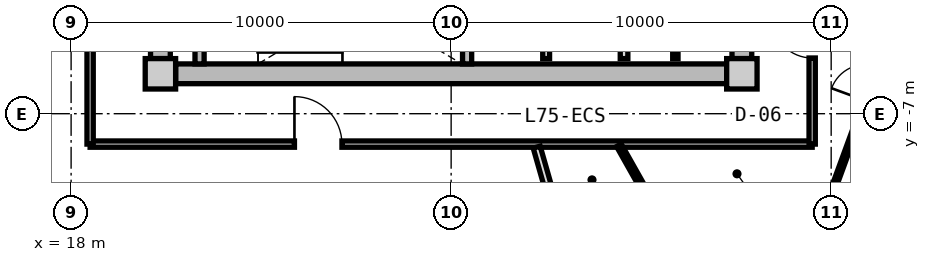
"""IFC4 building model, lengths in metres.
Left out: names, types, materials, properties, quantities, classifications, styles, units other than length and angle.
Written with IfcOpenShell. Run it as: python <this file> out.ifc"""

import sys

from ifc_helpers import new_model, si_unit, direction, frame, frame_2d, origin, origin_2d, place, context, subcontext, project, spatial, rectangle, extrude, source, transform, mapped, element, fill, save


model = new_model("IFC4")
c1 = context("Model", 3, precision=1e-05, world=origin(), true_north=direction((0.0, 1.0)))
c2 = subcontext(c1, "Body", "Model", "MODEL_VIEW")
j1 = project(units=[si_unit("LENGTHUNIT", "METRE"), si_unit("PLANEANGLEUNIT", "RADIAN")], contexts=[c1])
p1 = place(None, origin())
s1 = spatial("IfcSite", under=j1, at=p1, CompositionType="ELEMENT")
p2 = place(p1, origin())
s2 = spatial("IfcBuilding", under=s1, at=p2, CompositionType="ELEMENT")
p3 = place(p2, frame((0.0, 0.0, 241.35)))
s3 = spatial("IfcBuildingStorey", under=s2, at=p3, CompositionType="ELEMENT", Elevation=241.35)
m1 = source(origin(), c2, "Body", "SweptSolid", [
    extrude(rectangle(XDim=0.8, YDim=0.8, at=origin_2d()), origin(), (0.0, 0.0, 1.0), 3.05),
])
for number, where, z_axis, x_axis in (
    (1, (20.35, -5.95, 0.0), (0.0, 0.0, 1.0), (1.0, 0.0, 0.0)),
    (2, (35.65, -5.95, 0.0), (0.0, 0.0, 1.0), (1.0, 0.0, 0.0)),
):
    element("IfcColumn", number, at=place(p3, frame(where, z_axis=z_axis, x_axis=x_axis)), inside=s3, PredefinedType="COLUMN", context=c2, shape_type="MappedRepresentation", body=[
        mapped(m1, transform((0.0, 0.0, 0.0), x_axis=(1.0, 0.0, 0.0), y_axis=(0.0, 1.0, 0.0), z_axis=(0.0, 0.0, 1.0), scale=1.0)),
    ])
m2 = source(origin(), c2, "Body", "SweptSolid", [
    extrude(rectangle(XDim=14.5, YDim=0.52, at=frame_2d((7.25, 0.0))), origin(), (0.0, 0.0, 1.0), 2.73),
])
p4 = place(p3, frame((35.25, -5.95, 0.0), z_axis=(0.0, 0.0, 1.0), x_axis=(-1.0, 0.0, 0.0)))
e3 = element("IfcWall", 3, at=p4, inside=s3, PredefinedType="SHEAR", context=c2, shape_type="MappedRepresentation", body=[
    mapped(m2, transform((0.0, 0.0, 0.0), x_axis=(1.0, 0.0, 0.0), y_axis=(0.0, 1.0, 0.0), z_axis=(0.0, 0.0, 1.0), scale=1.0)),
])
m3 = source(origin(), c2, "Body", "SweptSolid", [
    extrude(rectangle(XDim=11.1, YDim=0.52, at=frame_2d((5.55, 0.0))), origin(), (0.0, 0.0, 1.0), 2.73),
])
p5 = place(p3, frame((20.35, -5.55, 0.0), z_axis=(0.0, 0.0, 1.0), x_axis=(0.0, 1.0, 0.0)))
e4 = element("IfcWall", 4, at=p5, inside=s3, PredefinedType="SHEAR", context=c2, shape_type="MappedRepresentation", body=[
    mapped(m3, transform((0.0, 0.0, 0.0), x_axis=(1.0, 0.0, 0.0), y_axis=(0.0, 1.0, 0.0), z_axis=(0.0, 0.0, 1.0), scale=1.0)),
])
p6 = place(p5, frame((3.8, 0.0, 0.0)))
e5 = element("IfcOpeningElement", 5, at=p6, cuts=e4, PredefinedType="OPENING", context=c2, shape_type="SweptSolid", body=[
    extrude(rectangle(XDim=1.2, YDim=2.15, at=frame_2d((0.6, 1.075))), frame((0.0, 0.27, 0.0), z_axis=(0.0, -1.0, 0.0), x_axis=(1.0, 0.0, 0.0)), (0.0, 0.0, 1.0), 0.54),
])
p7 = place(p3, frame((35.65, 5.55, 0.0), z_axis=(0.0, 0.0, 1.0), x_axis=(0.0, -1.0, 0.0)))
e6 = element("IfcWall", 6, at=p7, inside=s3, PredefinedType="SHEAR", context=c2, shape_type="MappedRepresentation", body=[
    mapped(m3, transform((0.0, 0.0, 0.0), x_axis=(1.0, 0.0, 0.0), y_axis=(0.0, 1.0, 0.0), z_axis=(0.0, 0.0, 1.0), scale=1.0)),
])
p8 = place(p7, frame((5.65, 0.0, 0.0)))
e7 = element("IfcOpeningElement", 7, at=p8, cuts=e6, PredefinedType="OPENING", context=c2, shape_type="SweptSolid", body=[
    extrude(rectangle(XDim=1.2, YDim=2.15, at=frame_2d((0.6, 1.075))), frame((0.0, 0.27, 0.0), z_axis=(0.0, -1.0, 0.0), x_axis=(1.0, 0.0, 0.0)), (0.0, 0.0, 1.0), 0.54),
])
m4 = source(origin(), c2, "Body", "SweptSolid", [
    extrude(rectangle(XDim=3.24, YDim=0.24, at=frame_2d((1.62, 0.0))), origin(), (0.0, 0.0, 1.0), 2.73),
])
for number, where, z_axis, x_axis in (
    (8, (21.38, -5.69, 0.0), (0.0, 0.0, 1.0), (0.0, 1.0, 0.0)),
    (9, (28.42, -5.69, 0.0), (0.0, 0.0, 1.0), (0.0, 1.0, 0.0)),
):
    element("IfcWall", number, at=place(p3, frame(where, z_axis=z_axis, x_axis=x_axis)), inside=s3, PredefinedType="PARTITIONING", context=c2, shape_type="MappedRepresentation", body=[
        mapped(m4, transform((0.0, 0.0, 0.0), x_axis=(1.0, 0.0, 0.0), y_axis=(0.0, 1.0, 0.0), z_axis=(0.0, 0.0, 1.0), scale=1.0)),
    ])
m5 = source(origin(), c2, "Body", "SweptSolid", [
    extrude(rectangle(XDim=3.8, YDim=0.2, at=frame_2d((1.9, 0.0))), origin(), (0.0, 0.0, 1.0), 2.715),
])
p9 = place(p3, frame((32.55, -5.55, 0.0), z_axis=(0.0, 0.0, 1.0), x_axis=(0.0, 1.0, 0.0)))
e10 = element("IfcWall", 10, at=p9, inside=s3, PredefinedType="PARTITIONING", context=c2, shape_type="MappedRepresentation", body=[
    mapped(m5, transform((0.0, 0.0, 0.0), x_axis=(1.0, 0.0, 0.0), y_axis=(0.0, 1.0, 0.0), z_axis=(0.0, 0.0, 1.0), scale=1.0)),
])
m6 = source(origin(), c2, "Body", "SweptSolid", [
    extrude(rectangle(XDim=4.2, YDim=0.18, at=frame_2d((2.1, 0.0))), origin(), (0.0, 0.0, 1.0), 2.715),
])
p10 = place(p3, frame((30.5, -5.55, 0.0), z_axis=(0.0, 0.0, 1.0), x_axis=(0.0, 1.0, 0.0)))
e11 = element("IfcWall", 11, at=p10, inside=s3, PredefinedType="PARTITIONING", context=c2, shape_type="MappedRepresentation", body=[
    mapped(m6, transform((0.0, 0.0, 0.0), x_axis=(1.0, 0.0, 0.0), y_axis=(0.0, 1.0, 0.0), z_axis=(0.0, 0.0, 1.0), scale=1.0)),
])
m7 = source(origin(), c2, "Body", "SweptSolid", [
    extrude(rectangle(XDim=3.8, YDim=0.14, at=frame_2d((1.9, 0.0))), origin(), (0.0, 0.0, 1.0), 2.715),
])
p11 = place(p3, frame((33.9, -5.55, 0.0), z_axis=(0.0, 0.0, 1.0), x_axis=(0.0, 1.0, 0.0)))
e12 = element("IfcWall", 12, at=p11, inside=s3, PredefinedType="PARTITIONING", context=c2, shape_type="MappedRepresentation", body=[
    mapped(m7, transform((0.0, 0.0, 0.0), x_axis=(1.0, 0.0, 0.0), y_axis=(0.0, 1.0, 0.0), z_axis=(0.0, 0.0, 1.0), scale=1.0)),
])
m8 = source(origin(), c2, "Body", "SweptSolid", [
    extrude(rectangle(XDim=19.0, YDim=0.165, at=frame_2d((9.5, 0.0))), origin(), (0.0, 0.0, 1.0), 2.715),
])
p12 = place(p3, frame((37.5, -7.8, 0.0), z_axis=(0.0, 0.0, 1.0), x_axis=(-1.0, 0.0, 0.0)))
e13 = element("IfcWall", 13, at=p12, inside=s3, PredefinedType="PARTITIONING", context=c2, shape_type="MappedRepresentation", body=[
    mapped(m8, transform((0.0, 0.0, 0.0), x_axis=(1.0, 0.0, 0.0), y_axis=(0.0, 1.0, 0.0), z_axis=(0.0, 0.0, 1.0), scale=1.0)),
])
p13 = place(p12, frame((12.373, 0.0, 0.0)))
e14 = element("IfcOpeningElement", 14, at=p13, cuts=e13, PredefinedType="OPENING", context=c2, shape_type="SweptSolid", body=[
    extrude(rectangle(XDim=1.25, YDim=2.2, at=frame_2d((0.625, 1.1))), frame((0.0, 0.093, 0.0), z_axis=(0.0, -1.0, 0.0), x_axis=(1.0, 0.0, 0.0)), (0.0, 0.0, 1.0), 0.185),
])
m9 = source(origin(), c2, "Body", "SweptSolid", [
    extrude(rectangle(XDim=6.88, YDim=0.165, at=frame_2d((3.44, 0.0))), origin(), (0.0, 0.0, 1.0), 2.715),
])
p14 = place(p3, frame((18.5, -7.8, 0.0), z_axis=(0.0, 0.0, 1.0), x_axis=(0.0, 1.0, 0.0)))
e15 = element("IfcWall", 15, at=p14, inside=s3, PredefinedType="PARTITIONING", context=c2, shape_type="MappedRepresentation", body=[
    mapped(m9, transform((0.0, 0.0, 0.0), x_axis=(1.0, 0.0, 0.0), y_axis=(0.0, 1.0, 0.0), z_axis=(0.0, 0.0, 1.0), scale=1.0)),
])
p15 = place(p3, frame((37.5, -0.92, 0.0), z_axis=(0.0, 0.0, 1.0), x_axis=(0.0, -1.0, 0.0)))
e16 = element("IfcWall", 16, at=p15, inside=s3, PredefinedType="PARTITIONING", context=c2, shape_type="MappedRepresentation", body=[
    mapped(m9, transform((0.0, 0.0, 0.0), x_axis=(1.0, 0.0, 0.0), y_axis=(0.0, 1.0, 0.0), z_axis=(0.0, 0.0, 1.0), scale=1.0)),
])
p16 = place(p15, frame((3.564, 0.0, 0.0)))
e17 = element("IfcOpeningElement", 17, at=p16, cuts=e16, PredefinedType="OPENING", context=c2, shape_type="SweptSolid", body=[
    extrude(rectangle(XDim=1.05, YDim=2.15, at=frame_2d((0.525, 1.075))), frame((0.0, 0.093, 0.0), z_axis=(0.0, -1.0, 0.0), x_axis=(1.0, 0.0, 0.0)), (0.0, 0.0, 1.0), 0.185),
])
m10 = source(origin(), c2, "Body", "SweptSolid", [
    extrude(rectangle(XDim=6.974, YDim=0.19, at=frame_2d((3.487, 0.0))), origin(), (0.0, 0.0, 1.0), 2.315),
])
p17 = place(p3, frame((30.251, -7.88, 0.0), z_axis=(0.0, 0.0, 1.0), x_axis=(0.274707256801, -0.961527910703, 0.0)))
e18 = element("IfcWall", 18, at=p17, inside=s3, PredefinedType="PARTITIONING", context=c2, shape_type="MappedRepresentation", body=[
    mapped(m10, transform((0.0, 0.0, 0.0), x_axis=(1.0, 0.0, 0.0), y_axis=(0.0, 1.0, 0.0), z_axis=(0.0, 0.0, 1.0), scale=1.0)),
])
m11 = source(origin(), c2, "Body", "SweptSolid", [
    extrude(rectangle(XDim=6.69, YDim=0.115, at=frame_2d((3.345, 0.0))), origin(), (0.0, 0.0, 1.0), 2.715),
])
p18 = place(p3, frame((37.917, -9.352, 0.0), z_axis=(0.0, 0.0, 1.0), x_axis=(0.343693784919, 0.939081776102, 0.0)))
e19 = element("IfcWall", 19, at=p18, inside=s3, PredefinedType="PARTITIONING", context=c2, shape_type="MappedRepresentation", body=[
    mapped(m11, transform((0.0, 0.0, 0.0), x_axis=(1.0, 0.0, 0.0), y_axis=(0.0, 1.0, 0.0), z_axis=(0.0, 0.0, 1.0), scale=1.0)),
])
p19 = place(p18, frame((2.87, 0.0, 0.0)))
e20 = element("IfcOpeningElement", 20, at=p19, cuts=e19, PredefinedType="OPENING", context=c2, shape_type="SweptSolid", body=[
    extrude(rectangle(XDim=0.95, YDim=2.1, at=frame_2d((0.475, 1.05))), frame((0.0, 0.067, 0.0), z_axis=(0.0, -1.0, 0.0), x_axis=(1.0, 0.0, 0.0)), (0.0, 0.0, 1.0), 0.135),
])
m12 = source(origin(), c2, "Body", "SweptSolid", [
    extrude(rectangle(XDim=2.035, YDim=0.14, at=frame_2d((1.018, 0.0))), origin(), (0.0, 0.0, 1.0), 2.715),
])
p20 = place(p3, frame((32.415, -7.83, 0.0), z_axis=(0.0, 0.0, 1.0), x_axis=(0.491092509169, -0.871107425888, 0.0)))
e21 = element("IfcWall", 21, at=p20, inside=s3, PredefinedType="PARTITIONING", context=c2, shape_type="MappedRepresentation", body=[
    mapped(m12, transform((0.0, 0.0, 0.0), x_axis=(1.0, 0.0, 0.0), y_axis=(0.0, 1.0, 0.0), z_axis=(0.0, 0.0, 1.0), scale=1.0)),
])
m13 = source(origin(), c2, "Body", "SweptSolid", [
    extrude(rectangle(XDim=1.25, YDim=2.2, at=frame_2d((0.625, 1.1))), frame((0.0, 0.025, 0.0), z_axis=(0.0, -1.0, 0.0), x_axis=(1.0, 0.0, 0.0)), (0.0, 0.0, 1.0), 0.05),
])
p21 = place(p13, frame((1.25, 0.0, 0.0), z_axis=(0.0, 0.0, 1.0), x_axis=(-1.0, 0.0, 0.0)))
e22 = element("IfcDoor", 22, at=p21, inside=s3, OperationType="SINGLE_SWING_LEFT", PredefinedType="DOOR", context=c2, shape_type="MappedRepresentation", body=[
    mapped(m13, transform((0.0, 0.0, 0.0), x_axis=(1.0, 0.0, 0.0), y_axis=(0.0, 1.0, 0.0), z_axis=(0.0, 0.0, 1.0), scale=1.0)),
])
fill(e14, e22)
m14 = source(origin(), c2, "Body", "SweptSolid", [
    extrude(rectangle(XDim=1.05, YDim=2.15, at=frame_2d((0.525, 1.075))), frame((0.0, 0.025, 0.0), z_axis=(0.0, -1.0, 0.0), x_axis=(1.0, 0.0, 0.0)), (0.0, 0.0, 1.0), 0.05),
])
p22 = place(p16, frame((1.05, 0.0, 0.0), z_axis=(0.0, 0.0, 1.0), x_axis=(-1.0, 0.0, 0.0)))
e23 = element("IfcDoor", 23, at=p22, inside=s3, OperationType="SINGLE_SWING_RIGHT", PredefinedType="DOOR", context=c2, shape_type="MappedRepresentation", body=[
    mapped(m14, transform((0.0, 0.0, 0.0), x_axis=(1.0, 0.0, 0.0), y_axis=(0.0, 1.0, 0.0), z_axis=(0.0, 0.0, 1.0), scale=1.0)),
])
fill(e17, e23)
save(model, sys.argv[1])
